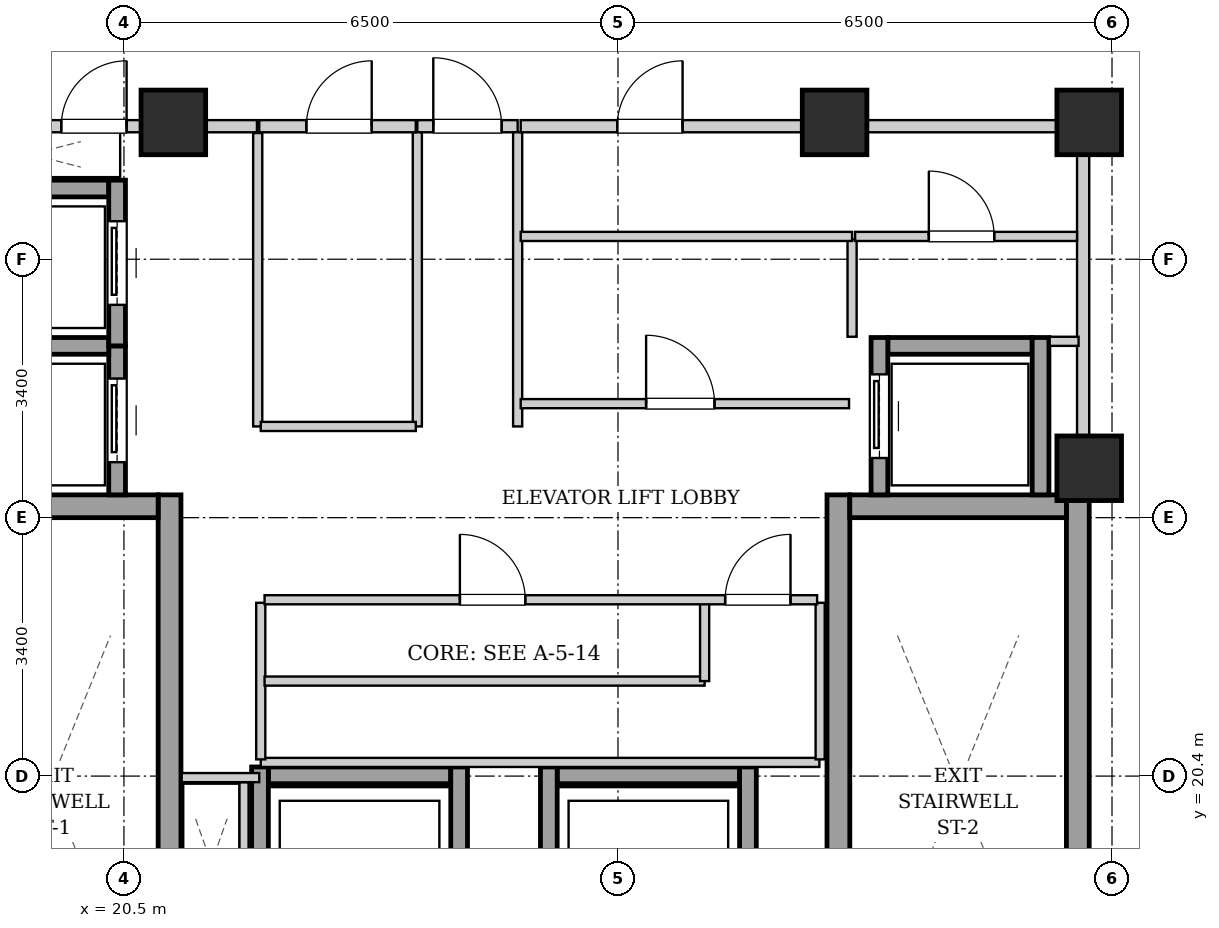
"""IFC4 building model, lengths in metres.
Left out: names, types, materials, properties, quantities, classifications, styles, units other than length and angle.
Written with IfcOpenShell. Run it as: python <this file> out.ifc"""

import sys

from ifc_helpers import new_model, si_unit, direction, frame, frame_2d, origin, origin_2d, place, context, subcontext, project, spatial, rectangle, extrude, element, fill, save


model = new_model("IFC4")
c1 = context("Model", 3, precision=1e-05, world=origin(), true_north=direction((0.0, 1.0)))
c2 = subcontext(c1, "Body", "Model", "MODEL_VIEW")
j1 = project(units=[si_unit("LENGTHUNIT", "METRE"), si_unit("PLANEANGLEUNIT", "RADIAN")], contexts=[c1])
p1 = place(None, origin())
s1 = spatial("IfcSite", under=j1, at=p1, CompositionType="ELEMENT")
p2 = place(p1, origin())
s2 = spatial("IfcBuilding", under=s1, at=p2, CompositionType="ELEMENT")
p3 = place(p2, frame((0.0, 0.0, 181.0)))
s3 = spatial("IfcBuildingStorey", under=s2, at=p3, CompositionType="ELEMENT", Elevation=181.0)
for number, where, z_axis, x_axis in (
    (1, (21.15, 29.0, 0.0), (0.0, 0.0, 1.0), (1.0, 0.0, 0.0)),
    (2, (29.85, 29.0, 0.0), (0.0, 0.0, 1.0), (1.0, 0.0, 0.0)),
    (3, (33.2, 29.0, 0.0), (0.0, 0.0, 1.0), (1.0, 0.0, 0.0)),
    (4, (33.2, 24.45, 0.0), (0.0, 0.0, 1.0), (1.0, 0.0, 0.0)),
):
    element("IfcColumn", number, at=place(p3, frame(where, z_axis=z_axis, x_axis=x_axis)), inside=s3, PredefinedType="COLUMN", context=c2, shape_type="SweptSolid", body=[
        extrude(rectangle(XDim=0.85, YDim=0.85, at=origin_2d()), origin(), (0.0, 0.0, 1.0), 3.3),
    ])
p4 = place(p3, frame((21.1, 15.1, 0.0), z_axis=(0.0, 0.0, 1.0), x_axis=(0.0, 1.0, 0.0)))
e5 = element("IfcWall", 5, at=p4, inside=s3, PredefinedType="SHEAR", context=c2, shape_type="SweptSolid", body=[
    extrude(rectangle(XDim=9.0, YDim=0.3, at=frame_2d((4.5, 0.0))), origin(), (0.0, 0.0, 1.0), 3.04),
])
p5 = place(p3, frame((18.1, 23.95, 0.0), z_axis=(0.0, 0.0, 1.0), x_axis=(1.0, 0.0, 0.0)))
e6 = element("IfcWall", 6, at=p5, inside=s3, PredefinedType="SHEAR", context=c2, shape_type="SweptSolid", body=[
    extrude(rectangle(XDim=2.85, YDim=0.3, at=frame_2d((1.425, 0.0))), origin(), (0.0, 0.0, 1.0), 3.04),
])
for number, where, z_axis, x_axis in (
    (7, (29.9, 15.1, 0.0), (0.0, 0.0, 1.0), (0.0, 1.0, 0.0)),
    (8, (33.05, 15.1, 0.0), (0.0, 0.0, 1.0), (0.0, 1.0, 0.0)),
):
    element("IfcWall", number, at=place(p3, frame(where, z_axis=z_axis, x_axis=x_axis)), inside=s3, PredefinedType="SHEAR", context=c2, shape_type="SweptSolid", body=[
        extrude(rectangle(XDim=9.0, YDim=0.3, at=frame_2d((4.5, 0.0))), origin(), (0.0, 0.0, 1.0), 3.04),
    ])
p6 = place(p3, frame((30.05, 23.95, 0.0), z_axis=(0.0, 0.0, 1.0), x_axis=(1.0, 0.0, 0.0)))
e9 = element("IfcWall", 9, at=p6, inside=s3, PredefinedType="SHEAR", context=c2, shape_type="SweptSolid", body=[
    extrude(rectangle(XDim=2.85, YDim=0.3, at=frame_2d((1.425, 0.0))), origin(), (0.0, 0.0, 1.0), 3.04),
])
p7 = place(p3, frame((20.41, 24.1, 0.0), z_axis=(0.0, 0.0, 1.0), x_axis=(0.0, 1.0, 0.0)))
e10 = element("IfcWall", 10, at=p7, inside=s3, PredefinedType="SHEAR", context=c2, shape_type="SweptSolid", body=[
    extrude(rectangle(XDim=1.96, YDim=0.22, at=frame_2d((0.98, 0.0))), origin(), (0.0, 0.0, 1.0), 3.04),
])
p8 = place(p7, frame((0.43, 0.0, 0.0)))
e11 = element("IfcOpeningElement", 11, at=p8, cuts=e10, PredefinedType="OPENING", context=c2, shape_type="SweptSolid", body=[
    extrude(rectangle(XDim=1.1, YDim=2.15, at=frame_2d((0.55, 1.075))), frame((0.0, 0.12, 0.0), z_axis=(0.0, -1.0, 0.0), x_axis=(1.0, 0.0, 0.0)), (0.0, 0.0, 1.0), 0.24),
])
for number, where, z_axis, x_axis in (
    (12, (18.4, 26.06, 0.0), (0.0, 0.0, 1.0), (1.0, 0.0, 0.0)),
    (13, (18.4, 28.13, 0.0), (0.0, 0.0, 1.0), (1.0, 0.0, 0.0)),
):
    element("IfcWall", number, at=place(p3, frame(where, z_axis=z_axis, x_axis=x_axis)), inside=s3, PredefinedType="SHEAR", context=c2, shape_type="SweptSolid", body=[
        extrude(rectangle(XDim=1.9, YDim=0.22, at=frame_2d((0.95, 0.0))), origin(), (0.0, 0.0, 1.0), 3.04),
    ])
p9 = place(p3, frame((20.41, 26.06, 0.0), z_axis=(0.0, 0.0, 1.0), x_axis=(0.0, 1.0, 0.0)))
e14 = element("IfcWall", 14, at=p9, inside=s3, PredefinedType="SHEAR", context=c2, shape_type="SweptSolid", body=[
    extrude(rectangle(XDim=2.18, YDim=0.22, at=frame_2d((1.09, 0.0))), origin(), (0.0, 0.0, 1.0), 3.04),
])
p10 = place(p9, frame((0.54, 0.0, 0.0)))
e15 = element("IfcOpeningElement", 15, at=p10, cuts=e14, PredefinedType="OPENING", context=c2, shape_type="SweptSolid", body=[
    extrude(rectangle(XDim=1.1, YDim=2.15, at=frame_2d((0.55, 1.075))), frame((0.0, 0.12, 0.0), z_axis=(0.0, -1.0, 0.0), x_axis=(1.0, 0.0, 0.0)), (0.0, 0.0, 1.0), 0.24),
])
p11 = place(p3, frame((30.55, 26.06, 0.0), z_axis=(0.0, 0.0, 1.0), x_axis=(1.0, 0.0, 0.0)))
e16 = element("IfcWall", 16, at=p11, inside=s3, PredefinedType="SHEAR", context=c2, shape_type="SweptSolid", body=[
    extrude(rectangle(XDim=1.9, YDim=0.22, at=frame_2d((0.95, 0.0))), origin(), (0.0, 0.0, 1.0), 3.04),
])
p12 = place(p3, frame((30.44, 24.1, 0.0), z_axis=(0.0, 0.0, 1.0), x_axis=(0.0, 1.0, 0.0)))
e17 = element("IfcWall", 17, at=p12, inside=s3, PredefinedType="SHEAR", context=c2, shape_type="SweptSolid", body=[
    extrude(rectangle(XDim=2.07, YDim=0.22, at=frame_2d((1.035, 0.0))), origin(), (0.0, 0.0, 1.0), 3.04),
])
p13 = place(p12, frame((0.485, 0.0, 0.0)))
e18 = element("IfcOpeningElement", 18, at=p13, cuts=e17, PredefinedType="OPENING", context=c2, shape_type="SweptSolid", body=[
    extrude(rectangle(XDim=1.1, YDim=2.15, at=frame_2d((0.55, 1.075))), frame((0.0, 0.12, 0.0), z_axis=(0.0, -1.0, 0.0), x_axis=(1.0, 0.0, 0.0)), (0.0, 0.0, 1.0), 0.24),
])
p14 = place(p3, frame((32.56, 24.1, 0.0), z_axis=(0.0, 0.0, 1.0), x_axis=(0.0, 1.0, 0.0)))
e19 = element("IfcWall", 19, at=p14, inside=s3, PredefinedType="SHEAR", context=c2, shape_type="SweptSolid", body=[
    extrude(rectangle(XDim=2.07, YDim=0.22, at=frame_2d((1.035, 0.0))), origin(), (0.0, 0.0, 1.0), 3.04),
])
p15 = place(p3, frame((22.4, 20.41, 0.0), z_axis=(0.0, 0.0, 1.0), x_axis=(1.0, 0.0, 0.0)))
e20 = element("IfcWall", 20, at=p15, inside=s3, PredefinedType="SHEAR", context=c2, shape_type="SweptSolid", body=[
    extrude(rectangle(XDim=2.4, YDim=0.22, at=frame_2d((1.2, 0.0))), origin(), (0.0, 0.0, 1.0), 3.04),
])
for number, where, z_axis, x_axis in (
    (21, (22.29, 17.98, 0.0), (0.0, 0.0, 1.0), (0.0, 1.0, 0.0)),
    (22, (24.91, 17.98, 0.0), (0.0, 0.0, 1.0), (0.0, 1.0, 0.0)),
):
    element("IfcWall", number, at=place(p3, frame(where, z_axis=z_axis, x_axis=x_axis)), inside=s3, PredefinedType="SHEAR", context=c2, shape_type="SweptSolid", body=[
        extrude(rectangle(XDim=2.54, YDim=0.22, at=frame_2d((1.27, 0.0))), origin(), (0.0, 0.0, 1.0), 3.04),
    ])
p16 = place(p3, frame((26.2, 20.41, 0.0), z_axis=(0.0, 0.0, 1.0), x_axis=(1.0, 0.0, 0.0)))
e23 = element("IfcWall", 23, at=p16, inside=s3, PredefinedType="SHEAR", context=c2, shape_type="SweptSolid", body=[
    extrude(rectangle(XDim=2.4, YDim=0.22, at=frame_2d((1.2, 0.0))), origin(), (0.0, 0.0, 1.0), 3.04),
])
for number, where, z_axis, x_axis in (
    (24, (26.09, 17.98, 0.0), (0.0, 0.0, 1.0), (0.0, 1.0, 0.0)),
    (25, (28.71, 17.98, 0.0), (0.0, 0.0, 1.0), (0.0, 1.0, 0.0)),
):
    element("IfcWall", number, at=place(p3, frame(where, z_axis=z_axis, x_axis=x_axis)), inside=s3, PredefinedType="SHEAR", context=c2, shape_type="SweptSolid", body=[
        extrude(rectangle(XDim=2.54, YDim=0.22, at=frame_2d((1.27, 0.0))), origin(), (0.0, 0.0, 1.0), 3.04),
    ])
p17 = place(p3, frame((33.12, 24.12, 0.0), z_axis=(0.0, 0.0, 1.0), x_axis=(0.0, 1.0, 0.0)))
e26 = element("IfcWall", 26, at=p17, inside=s3, PredefinedType="PARTITIONING", context=c2, shape_type="SweptSolid", body=[
    extrude(rectangle(XDim=4.76, YDim=0.16, at=frame_2d((2.38, 0.0))), origin(), (0.0, 0.0, 1.0), 3.04),
])
p18 = place(p3, frame((24.36, 28.95, 0.0), z_axis=(0.0, 0.0, 1.0), x_axis=(1.0, 0.0, 0.0)))
e27 = element("IfcWall", 27, at=p18, inside=s3, PredefinedType="PARTITIONING", context=c2, shape_type="SweptSolid", body=[
    extrude(rectangle(XDim=1.32, YDim=0.16, at=frame_2d((0.66, 0.0))), origin(), (0.0, 0.0, 1.0), 2.556),
])
p19 = place(p18, frame((0.21, 0.0, 0.0)))
e28 = element("IfcOpeningElement", 28, at=p19, cuts=e27, PredefinedType="OPENING", context=c2, shape_type="SweptSolid", body=[
    extrude(rectangle(XDim=0.9, YDim=2.05, at=frame_2d((0.45, 1.025))), frame((0.0, 0.09, 0.0), z_axis=(0.0, -1.0, 0.0), x_axis=(1.0, 0.0, 0.0)), (0.0, 0.0, 1.0), 0.18),
])
p20 = place(p3, frame((17.96, 28.95, 0.0), z_axis=(0.0, 0.0, 1.0), x_axis=(1.0, 0.0, 0.0)))
e29 = element("IfcWall", 29, at=p20, inside=s3, PredefinedType="PARTITIONING", context=c2, shape_type="SweptSolid", body=[
    extrude(rectangle(XDim=4.29, YDim=0.16, at=frame_2d((2.145, 0.0))), origin(), (0.0, 0.0, 1.0), 2.556),
])
p21 = place(p20, frame((1.715, 0.0, 0.0)))
e30 = element("IfcOpeningElement", 30, at=p21, cuts=e29, PredefinedType="OPENING", context=c2, shape_type="SweptSolid", body=[
    extrude(rectangle(XDim=0.86, YDim=2.05, at=frame_2d((0.43, 1.025))), frame((0.0, 0.09, 0.0), z_axis=(0.0, -1.0, 0.0), x_axis=(1.0, 0.0, 0.0)), (0.0, 0.0, 1.0), 0.18),
])
p22 = place(p3, frame((22.08, 18.2, 0.0), z_axis=(0.0, 0.0, 1.0), x_axis=(0.0, 1.0, 0.0)))
e31 = element("IfcWall", 31, at=p22, inside=s3, PredefinedType="PARTITIONING", context=c2, shape_type="SweptSolid", body=[
    extrude(rectangle(XDim=2.12, YDim=0.12, at=frame_2d((1.06, 0.0))), origin(), (0.0, 0.0, 1.0), 3.04),
])
p23 = place(p3, frame((22.28, 20.38, 0.0), z_axis=(0.0, 0.0, 1.0), x_axis=(-1.0, 0.0, 0.0)))
e32 = element("IfcWall", 32, at=p23, inside=s3, PredefinedType="PARTITIONING", context=c2, shape_type="SweptSolid", body=[
    extrude(rectangle(XDim=1.02, YDim=0.12, at=frame_2d((0.51, 0.0))), origin(), (0.0, 0.0, 1.0), 3.04),
])
for number, where, z_axis, x_axis in (
    (33, (24.36, 25.0, 0.0), (0.0, 0.0, 1.0), (0.0, 1.0, 0.0)),
    (34, (25.68, 25.0, 0.0), (0.0, 0.0, 1.0), (0.0, 1.0, 0.0)),
):
    element("IfcWall", number, at=place(p3, frame(where, z_axis=z_axis, x_axis=x_axis)), inside=s3, PredefinedType="PARTITIONING", context=c2, shape_type="SweptSolid", body=[
        extrude(rectangle(XDim=3.87, YDim=0.12, at=frame_2d((1.935, 0.0))), origin(), (0.0, 0.0, 1.0), 3.04),
    ])
p24 = place(p3, frame((30.08, 26.18, 0.0), z_axis=(0.0, 0.0, 1.0), x_axis=(0.0, 1.0, 0.0)))
e35 = element("IfcWall", 35, at=p24, inside=s3, PredefinedType="PARTITIONING", context=c2, shape_type="SweptSolid", body=[
    extrude(rectangle(XDim=1.28, YDim=0.12, at=frame_2d((0.64, 0.0))), origin(), (0.0, 0.0, 1.0), 3.04),
])
p25 = place(p3, frame((32.68, 26.12, 0.0), z_axis=(0.0, 0.0, 1.0), x_axis=(1.0, 0.0, 0.0)))
e36 = element("IfcWall", 36, at=p25, inside=s3, PredefinedType="PARTITIONING", context=c2, shape_type="SweptSolid", body=[
    extrude(rectangle(XDim=0.38, YDim=0.12, at=frame_2d((0.19, 0.0))), origin(), (0.0, 0.0, 1.0), 3.04),
])
p26 = place(p3, frame((30.12, 27.5, 0.0), z_axis=(0.0, 0.0, 1.0), x_axis=(1.0, 0.0, 0.0)))
e37 = element("IfcWall", 37, at=p26, inside=s3, PredefinedType="PARTITIONING", context=c2, shape_type="SweptSolid", body=[
    extrude(rectangle(XDim=2.92, YDim=0.12, at=frame_2d((1.46, 0.0))), origin(), (0.0, 0.0, 1.0), 3.04),
])
p27 = place(p26, frame((0.97, 0.0, 0.0)))
e38 = element("IfcOpeningElement", 38, at=p27, cuts=e37, PredefinedType="OPENING", context=c2, shape_type="SweptSolid", body=[
    extrude(rectangle(XDim=0.86, YDim=2.05, at=frame_2d((0.43, 1.025))), frame((0.0, 0.07, 0.0), z_axis=(0.0, -1.0, 0.0), x_axis=(1.0, 0.0, 0.0)), (0.0, 0.0, 1.0), 0.14),
])
p28 = place(p3, frame((22.26, 25.0, 0.0), z_axis=(0.0, 0.0, 1.0), x_axis=(0.0, 1.0, 0.0)))
e39 = element("IfcWall", 39, at=p28, inside=s3, PredefinedType="PARTITIONING", context=c2, shape_type="SweptSolid", body=[
    extrude(rectangle(XDim=3.86, YDim=0.12, at=frame_2d((1.93, 0.0))), origin(), (0.0, 0.0, 1.0), 3.04),
])
p29 = place(p3, frame((22.3, 25.0, 0.0), z_axis=(0.0, 0.0, 1.0), x_axis=(1.0, 0.0, 0.0)))
e40 = element("IfcWall", 40, at=p29, inside=s3, PredefinedType="PARTITIONING", context=c2, shape_type="SweptSolid", body=[
    extrude(rectangle(XDim=2.04, YDim=0.12, at=frame_2d((1.02, 0.0))), origin(), (0.0, 0.0, 1.0), 3.04),
])
p30 = place(p3, frame((22.28, 28.95, 0.0), z_axis=(0.0, 0.0, 1.0), x_axis=(1.0, 0.0, 0.0)))
e41 = element("IfcWall", 41, at=p30, inside=s3, PredefinedType="PARTITIONING", context=c2, shape_type="SweptSolid", body=[
    extrude(rectangle(XDim=2.06, YDim=0.16, at=frame_2d((1.03, 0.0))), origin(), (0.0, 0.0, 1.0), 2.556),
])
p31 = place(p30, frame((0.62, 0.0, 0.0)))
e42 = element("IfcOpeningElement", 42, at=p31, cuts=e41, PredefinedType="OPENING", context=c2, shape_type="SweptSolid", body=[
    extrude(rectangle(XDim=0.86, YDim=2.05, at=frame_2d((0.43, 1.025))), frame((0.0, 0.09, 0.0), z_axis=(0.0, -1.0, 0.0), x_axis=(1.0, 0.0, 0.0)), (0.0, 0.0, 1.0), 0.18),
])
p32 = place(p3, frame((25.72, 27.5, 0.0), z_axis=(0.0, 0.0, 1.0), x_axis=(1.0, 0.0, 0.0)))
e43 = element("IfcWall", 43, at=p32, inside=s3, PredefinedType="PARTITIONING", context=c2, shape_type="SweptSolid", body=[
    extrude(rectangle(XDim=4.36, YDim=0.12, at=frame_2d((2.18, 0.0))), origin(), (0.0, 0.0, 1.0), 3.04),
])
p33 = place(p3, frame((25.72, 25.3, 0.0), z_axis=(0.0, 0.0, 1.0), x_axis=(1.0, 0.0, 0.0)))
e44 = element("IfcWall", 44, at=p33, inside=s3, PredefinedType="PARTITIONING", context=c2, shape_type="SweptSolid", body=[
    extrude(rectangle(XDim=4.32, YDim=0.12, at=frame_2d((2.16, 0.0))), origin(), (0.0, 0.0, 1.0), 3.04),
])
p34 = place(p33, frame((1.65, 0.0, 0.0)))
e45 = element("IfcOpeningElement", 45, at=p34, cuts=e44, PredefinedType="OPENING", context=c2, shape_type="SweptSolid", body=[
    extrude(rectangle(XDim=0.9, YDim=2.05, at=frame_2d((0.45, 1.025))), frame((0.0, 0.07, 0.0), z_axis=(0.0, -1.0, 0.0), x_axis=(1.0, 0.0, 0.0)), (0.0, 0.0, 1.0), 0.14),
])
p35 = place(p3, frame((25.72, 28.95, 0.0), z_axis=(0.0, 0.0, 1.0), x_axis=(1.0, 0.0, 0.0)))
e46 = element("IfcWall", 46, at=p35, inside=s3, PredefinedType="PARTITIONING", context=c2, shape_type="SweptSolid", body=[
    extrude(rectangle(XDim=7.32, YDim=0.16, at=frame_2d((3.66, 0.0))), origin(), (0.0, 0.0, 1.0), 2.556),
])
p36 = place(p35, frame((1.27, 0.0, 0.0)))
e47 = element("IfcOpeningElement", 47, at=p36, cuts=e46, PredefinedType="OPENING", context=c2, shape_type="SweptSolid", body=[
    extrude(rectangle(XDim=0.86, YDim=2.05, at=frame_2d((0.43, 1.025))), frame((0.0, 0.09, 0.0), z_axis=(0.0, -1.0, 0.0), x_axis=(1.0, 0.0, 0.0)), (0.0, 0.0, 1.0), 0.18),
])
p37 = place(p3, frame((22.3, 20.58, 0.0), z_axis=(0.0, 0.0, 1.0), x_axis=(1.0, 0.0, 0.0)))
e48 = element("IfcWall", 48, at=p37, inside=s3, PredefinedType="PARTITIONING", context=c2, shape_type="SweptSolid", body=[
    extrude(rectangle(XDim=7.35, YDim=0.12, at=frame_2d((3.675, 0.0))), origin(), (0.0, 0.0, 1.0), 3.04),
])
for number, where, z_axis, x_axis in (
    (49, (22.3, 20.62, 0.0), (0.0, 0.0, 1.0), (0.0, 1.0, 0.0)),
    (50, (29.66, 20.62, 0.0), (0.0, 0.0, 1.0), (0.0, 1.0, 0.0)),
):
    element("IfcWall", number, at=place(p3, frame(where, z_axis=z_axis, x_axis=x_axis)), inside=s3, PredefinedType="PARTITIONING", context=c2, shape_type="SweptSolid", body=[
        extrude(rectangle(XDim=2.06, YDim=0.12, at=frame_2d((1.03, 0.0))), origin(), (0.0, 0.0, 1.0), 3.04),
    ])
p38 = place(p3, frame((22.35, 21.65, 0.0), z_axis=(0.0, 0.0, 1.0), x_axis=(1.0, 0.0, 0.0)))
e51 = element("IfcWall", 51, at=p38, inside=s3, PredefinedType="PARTITIONING", context=c2, shape_type="SweptSolid", body=[
    extrude(rectangle(XDim=5.79, YDim=0.12, at=frame_2d((2.895, 0.0))), origin(), (0.0, 0.0, 1.0), 3.04),
])
p39 = place(p3, frame((28.14, 21.65, 0.0), z_axis=(0.0, 0.0, 1.0), x_axis=(0.0, 1.0, 0.0)))
e52 = element("IfcWall", 52, at=p39, inside=s3, PredefinedType="PARTITIONING", context=c2, shape_type="SweptSolid", body=[
    extrude(rectangle(XDim=1.03, YDim=0.12, at=frame_2d((0.515, 0.0))), origin(), (0.0, 0.0, 1.0), 3.04),
])
p40 = place(p3, frame((22.35, 22.72, 0.0), z_axis=(0.0, 0.0, 1.0), x_axis=(1.0, 0.0, 0.0)))
e53 = element("IfcWall", 53, at=p40, inside=s3, PredefinedType="PARTITIONING", context=c2, shape_type="SweptSolid", body=[
    extrude(rectangle(XDim=7.27, YDim=0.12, at=frame_2d((3.635, 0.0))), origin(), (0.0, 0.0, 1.0), 3.04),
])
p41 = place(p40, frame((2.57, 0.0, 0.0)))
e54 = element("IfcOpeningElement", 54, at=p41, cuts=e53, PredefinedType="OPENING", context=c2, shape_type="SweptSolid", body=[
    extrude(rectangle(XDim=0.86, YDim=2.05, at=frame_2d((0.43, 1.025))), frame((0.0, 0.07, 0.0), z_axis=(0.0, -1.0, 0.0), x_axis=(1.0, 0.0, 0.0)), (0.0, 0.0, 1.0), 0.14),
])
p42 = place(p40, frame((6.06, 0.0, 0.0)))
e55 = element("IfcOpeningElement", 55, at=p42, cuts=e53, PredefinedType="OPENING", context=c2, shape_type="SweptSolid", body=[
    extrude(rectangle(XDim=0.86, YDim=2.05, at=frame_2d((0.43, 1.025))), frame((0.0, 0.07, 0.0), z_axis=(0.0, -1.0, 0.0), x_axis=(1.0, 0.0, 0.0)), (0.0, 0.0, 1.0), 0.14),
])
p43 = place(p8, origin())
e56 = element("IfcDoor", 56, at=p43, inside=s3, OperationType="SLIDING_TO_LEFT", PredefinedType="DOOR", context=c2, shape_type="SweptSolid", body=[
    extrude(rectangle(XDim=1.1, YDim=2.15, at=frame_2d((0.55, 1.075))), frame((0.0, 0.025, 0.0), z_axis=(0.0, -1.0, 0.0), x_axis=(1.0, 0.0, 0.0)), (0.0, 0.0, 1.0), 0.05),
])
fill(e11, e56)
p44 = place(p10, origin())
e57 = element("IfcDoor", 57, at=p44, inside=s3, OperationType="SLIDING_TO_LEFT", PredefinedType="DOOR", context=c2, shape_type="SweptSolid", body=[
    extrude(rectangle(XDim=1.1, YDim=2.15, at=frame_2d((0.55, 1.075))), frame((0.0, 0.025, 0.0), z_axis=(0.0, -1.0, 0.0), x_axis=(1.0, 0.0, 0.0)), (0.0, 0.0, 1.0), 0.05),
])
fill(e15, e57)
p45 = place(p13, origin())
e58 = element("IfcDoor", 58, at=p45, inside=s3, OperationType="SLIDING_TO_LEFT", PredefinedType="DOOR", context=c2, shape_type="SweptSolid", body=[
    extrude(rectangle(XDim=1.1, YDim=2.15, at=frame_2d((0.55, 1.075))), frame((0.0, 0.025, 0.0), z_axis=(0.0, -1.0, 0.0), x_axis=(1.0, 0.0, 0.0)), (0.0, 0.0, 1.0), 0.05),
])
fill(e18, e58)
p46 = place(p19, origin())
e59 = element("IfcDoor", 59, at=p46, inside=s3, OperationType="SINGLE_SWING_LEFT", PredefinedType="DOOR", context=c2, shape_type="SweptSolid", body=[
    extrude(rectangle(XDim=0.9, YDim=2.05, at=frame_2d((0.45, 1.025))), frame((0.0, 0.025, 0.0), z_axis=(0.0, -1.0, 0.0), x_axis=(1.0, 0.0, 0.0)), (0.0, 0.0, 1.0), 0.05),
])
fill(e28, e59)
p47 = place(p21, origin())
e60 = element("IfcDoor", 60, at=p47, inside=s3, OperationType="SINGLE_SWING_RIGHT", PredefinedType="DOOR", context=c2, shape_type="SweptSolid", body=[
    extrude(rectangle(XDim=0.86, YDim=2.05, at=frame_2d((0.43, 1.025))), frame((0.0, 0.025, 0.0), z_axis=(0.0, -1.0, 0.0), x_axis=(1.0, 0.0, 0.0)), (0.0, 0.0, 1.0), 0.05),
])
fill(e30, e60)
p48 = place(p27, origin())
e61 = element("IfcDoor", 61, at=p48, inside=s3, OperationType="SINGLE_SWING_LEFT", PredefinedType="DOOR", context=c2, shape_type="SweptSolid", body=[
    extrude(rectangle(XDim=0.86, YDim=2.05, at=frame_2d((0.43, 1.025))), frame((0.0, 0.025, 0.0), z_axis=(0.0, -1.0, 0.0), x_axis=(1.0, 0.0, 0.0)), (0.0, 0.0, 1.0), 0.05),
])
fill(e38, e61)
p49 = place(p31, origin())
e62 = element("IfcDoor", 62, at=p49, inside=s3, OperationType="SINGLE_SWING_RIGHT", PredefinedType="DOOR", context=c2, shape_type="SweptSolid", body=[
    extrude(rectangle(XDim=0.86, YDim=2.05, at=frame_2d((0.43, 1.025))), frame((0.0, 0.025, 0.0), z_axis=(0.0, -1.0, 0.0), x_axis=(1.0, 0.0, 0.0)), (0.0, 0.0, 1.0), 0.05),
])
fill(e42, e62)
p50 = place(p34, origin())
e63 = element("IfcDoor", 63, at=p50, inside=s3, OperationType="SINGLE_SWING_LEFT", PredefinedType="DOOR", context=c2, shape_type="SweptSolid", body=[
    extrude(rectangle(XDim=0.9, YDim=2.05, at=frame_2d((0.45, 1.025))), frame((0.0, 0.025, 0.0), z_axis=(0.0, -1.0, 0.0), x_axis=(1.0, 0.0, 0.0)), (0.0, 0.0, 1.0), 0.05),
])
fill(e45, e63)
p51 = place(p36, origin())
e64 = element("IfcDoor", 64, at=p51, inside=s3, OperationType="SINGLE_SWING_RIGHT", PredefinedType="DOOR", context=c2, shape_type="SweptSolid", body=[
    extrude(rectangle(XDim=0.86, YDim=2.05, at=frame_2d((0.43, 1.025))), frame((0.0, 0.025, 0.0), z_axis=(0.0, -1.0, 0.0), x_axis=(1.0, 0.0, 0.0)), (0.0, 0.0, 1.0), 0.05),
])
fill(e47, e64)
p52 = place(p41, origin())
e65 = element("IfcDoor", 65, at=p52, inside=s3, OperationType="SINGLE_SWING_LEFT", PredefinedType="DOOR", context=c2, shape_type="SweptSolid", body=[
    extrude(rectangle(XDim=0.86, YDim=2.05, at=frame_2d((0.43, 1.025))), frame((0.0, 0.025, 0.0), z_axis=(0.0, -1.0, 0.0), x_axis=(1.0, 0.0, 0.0)), (0.0, 0.0, 1.0), 0.05),
])
fill(e54, e65)
p53 = place(p42, origin())
e66 = element("IfcDoor", 66, at=p53, inside=s3, OperationType="SINGLE_SWING_RIGHT", PredefinedType="DOOR", context=c2, shape_type="SweptSolid", body=[
    extrude(rectangle(XDim=0.86, YDim=2.05, at=frame_2d((0.43, 1.025))), frame((0.0, 0.025, 0.0), z_axis=(0.0, -1.0, 0.0), x_axis=(1.0, 0.0, 0.0)), (0.0, 0.0, 1.0), 0.05),
])
fill(e55, e66)
save(model, sys.argv[1])
